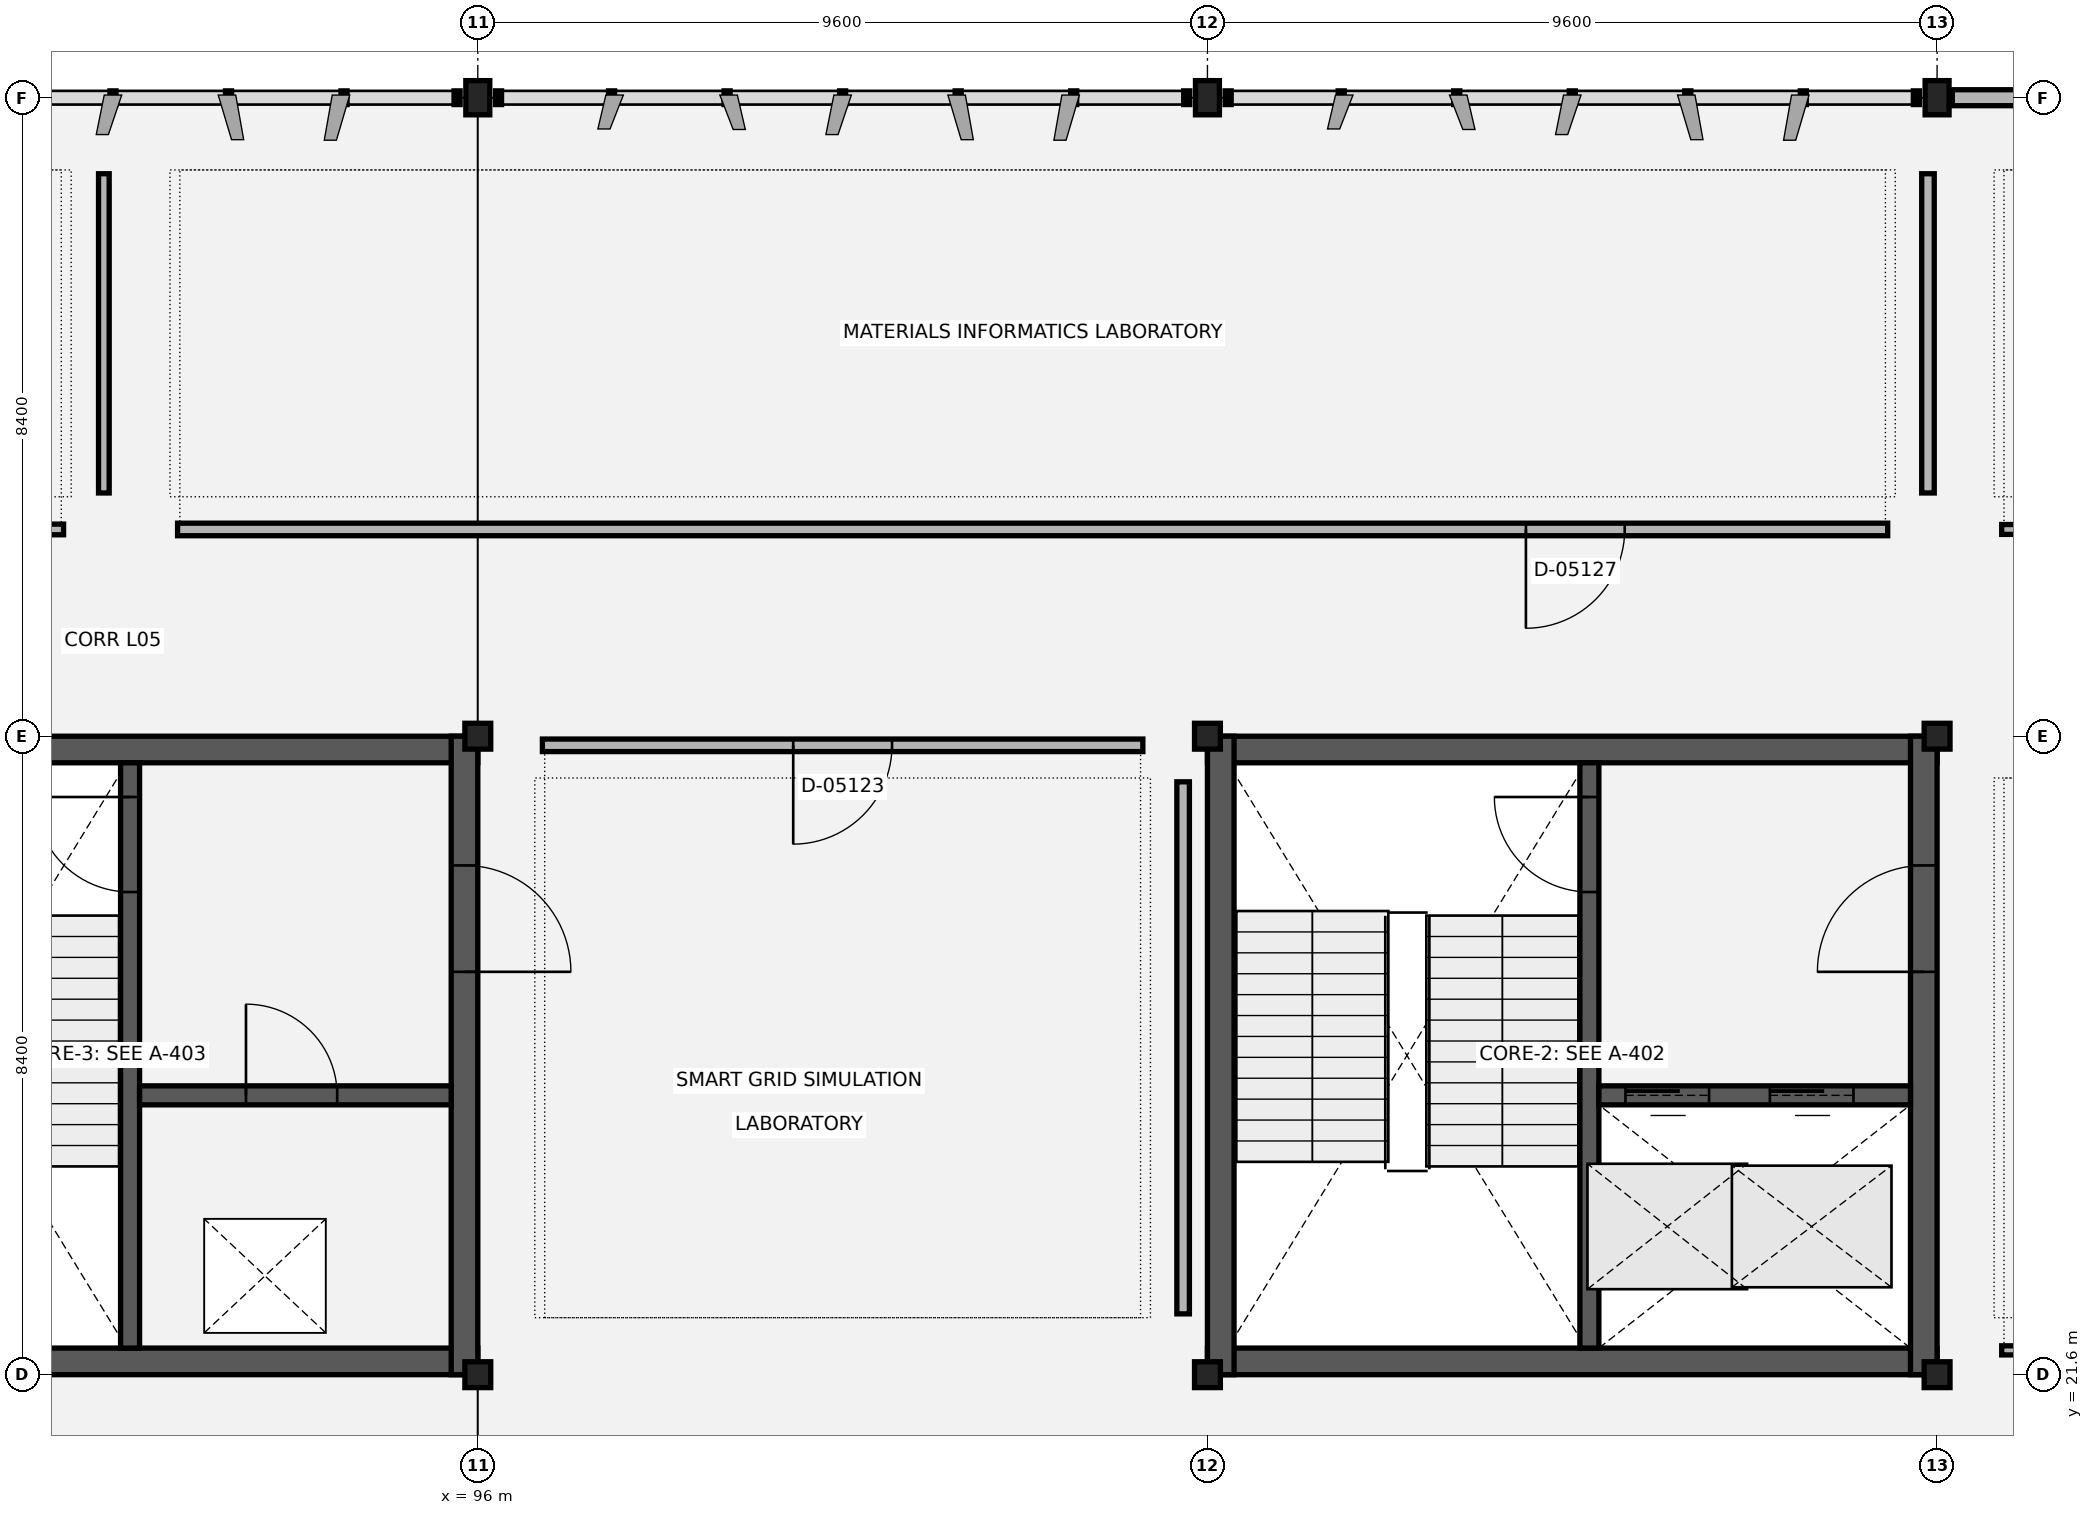
"""IFC4 building model, lengths in metres.
Left out: names, types, materials, properties, quantities, classifications, styles, units other than length and angle.
Written with IfcOpenShell. Run it as: python <this file> out.ifc"""

import sys

from ifc_helpers import new_model, si_unit, direction, frame, frame_2d, origin, origin_2d, place, context, subcontext, project, spatial, rectangle, extrude, element, fill, save


model = new_model("IFC4")
c1 = context("Model", 3, precision=1e-05, world=origin(), true_north=direction((0.0, 1.0)))
c2 = subcontext(c1, "Body", "Model", "MODEL_VIEW")
j1 = project(units=[si_unit("LENGTHUNIT", "METRE"), si_unit("PLANEANGLEUNIT", "RADIAN")], contexts=[c1])
p1 = place(None, origin())
s1 = spatial("IfcSite", under=j1, at=p1, CompositionType="ELEMENT")
p2 = place(p1, origin())
s2 = spatial("IfcBuilding", under=s1, at=p2, CompositionType="ELEMENT")
p3 = place(p2, frame((0.0, 0.0, 22.8)))
s3 = spatial("IfcBuildingStorey", under=s2, at=p3, CompositionType="ELEMENT", Elevation=22.8)
for number, where, z_axis, x_axis in (
    (1, (96.0, 21.6, 0.0), (0.0, 0.0, 1.0), (1.0, 0.0, 0.0)),
    (2, (96.0, 30.0, 0.0), (0.0, 0.0, 1.0), (1.0, 0.0, 0.0)),
):
    element("IfcColumn", number, at=place(p3, frame(where, z_axis=z_axis, x_axis=x_axis)), inside=s3, PredefinedType="COLUMN", context=c2, shape_type="SweptSolid", body=[
        extrude(rectangle(XDim=0.34, YDim=0.34, at=origin_2d()), origin(), (0.0, 0.0, 1.0), 4.2),
    ])
p4 = place(p3, frame((96.0, 38.4, 0.0), z_axis=(0.0, 0.0, 1.0), x_axis=(1.0, 0.0, 0.0)))
e3 = element("IfcColumn", 3, at=p4, inside=s3, PredefinedType="COLUMN", context=c2, shape_type="SweptSolid", body=[
    extrude(rectangle(XDim=0.315, YDim=0.45, at=origin_2d()), origin(), (0.0, 0.0, 1.0), 4.2),
])
for number, where, z_axis, x_axis in (
    (4, (105.6, 21.6, 0.0), (0.0, 0.0, 1.0), (1.0, 0.0, 0.0)),
    (5, (105.6, 30.0, 0.0), (0.0, 0.0, 1.0), (1.0, 0.0, 0.0)),
):
    element("IfcColumn", number, at=place(p3, frame(where, z_axis=z_axis, x_axis=x_axis)), inside=s3, PredefinedType="COLUMN", context=c2, shape_type="SweptSolid", body=[
        extrude(rectangle(XDim=0.34, YDim=0.34, at=origin_2d()), origin(), (0.0, 0.0, 1.0), 4.2),
    ])
p5 = place(p3, frame((105.6, 38.4, 0.0), z_axis=(0.0, 0.0, 1.0), x_axis=(1.0, 0.0, 0.0)))
e6 = element("IfcColumn", 6, at=p5, inside=s3, PredefinedType="COLUMN", context=c2, shape_type="SweptSolid", body=[
    extrude(rectangle(XDim=0.315, YDim=0.45, at=origin_2d()), origin(), (0.0, 0.0, 1.0), 4.2),
])
for number, where, z_axis, x_axis in (
    (7, (115.2, 21.6, 0.0), (0.0, 0.0, 1.0), (1.0, 0.0, 0.0)),
    (8, (115.2, 30.0, 0.0), (0.0, 0.0, 1.0), (1.0, 0.0, 0.0)),
):
    element("IfcColumn", number, at=place(p3, frame(where, z_axis=z_axis, x_axis=x_axis)), inside=s3, PredefinedType="COLUMN", context=c2, shape_type="SweptSolid", body=[
        extrude(rectangle(XDim=0.34, YDim=0.34, at=origin_2d()), origin(), (0.0, 0.0, 1.0), 4.2),
    ])
p6 = place(p3, frame((115.2, 38.4, 0.0), z_axis=(0.0, 0.0, 1.0), x_axis=(1.0, 0.0, 0.0)))
e9 = element("IfcColumn", 9, at=p6, inside=s3, PredefinedType="COLUMN", context=c2, shape_type="SweptSolid", body=[
    extrude(rectangle(XDim=0.315, YDim=0.45, at=origin_2d()), origin(), (0.0, 0.0, 1.0), 4.2),
])
p7 = place(p3, frame((119.8, 38.4, 0.0), z_axis=(0.0, 0.0, 1.0), x_axis=(-1.0, 0.0, 0.0)))
e10 = element("IfcWall", 10, at=p7, inside=s3, PredefinedType="SOLIDWALL", context=c2, shape_type="SweptSolid", body=[
    extrude(rectangle(XDim=4.4, YDim=0.21, at=frame_2d((2.2, 0.0))), origin(), (0.0, 0.0, 1.0), 3.07),
])
p8 = place(p7, frame((1.45, 0.0, 0.9)))
e11 = element("IfcOpeningElement", 11, at=p8, cuts=e10, PredefinedType="OPENING", context=c2, shape_type="SweptSolid", body=[
    extrude(rectangle(XDim=1.5, YDim=1.5, at=frame_2d((0.75, 0.75))), frame((0.0, 0.115, 0.0), z_axis=(0.0, -1.0, 0.0), x_axis=(1.0, 0.0, 0.0)), (0.0, 0.0, 1.0), 0.23),
])
for number, where, z_axis, x_axis in (
    (12, (105.6, 29.825, 0.0), (0.0, 0.0, 1.0), (1.0, 0.0, 0.0)),
    (13, (105.6, 21.775, 0.0), (0.0, 0.0, 1.0), (1.0, 0.0, 0.0)),
):
    element("IfcWall", number, at=place(p3, frame(where, z_axis=z_axis, x_axis=x_axis)), inside=s3, PredefinedType="SHEAR", context=c2, shape_type="SweptSolid", body=[
        extrude(rectangle(XDim=9.6, YDim=0.35, at=frame_2d((4.8, 0.0))), origin(), (0.0, 0.0, 1.0), 3.97),
    ])
p9 = place(p3, frame((105.775, 21.6, 0.0), z_axis=(0.0, 0.0, 1.0), x_axis=(0.0, 1.0, 0.0)))
e14 = element("IfcWall", 14, at=p9, inside=s3, PredefinedType="SHEAR", context=c2, shape_type="SweptSolid", body=[
    extrude(rectangle(XDim=8.4, YDim=0.35, at=frame_2d((4.2, 0.0))), origin(), (0.0, 0.0, 1.0), 3.97),
])
p10 = place(p3, frame((115.025, 21.6, 0.0), z_axis=(0.0, 0.0, 1.0), x_axis=(0.0, 1.0, 0.0)))
e15 = element("IfcWall", 15, at=p10, inside=s3, PredefinedType="SHEAR", context=c2, shape_type="SweptSolid", body=[
    extrude(rectangle(XDim=8.4, YDim=0.35, at=frame_2d((4.2, 0.0))), origin(), (0.0, 0.0, 1.0), 3.97),
])
p11 = place(p10, frame((5.3, 0.0, 0.0)))
e16 = element("IfcOpeningElement", 16, at=p11, cuts=e15, PredefinedType="OPENING", context=c2, shape_type="SweptSolid", body=[
    extrude(rectangle(XDim=1.4, YDim=2.15, at=frame_2d((0.7, 1.075))), frame((0.0, 0.185, 0.0), z_axis=(0.0, -1.0, 0.0), x_axis=(1.0, 0.0, 0.0)), (0.0, 0.0, 1.0), 0.37),
])
p12 = place(p3, frame((110.625, 29.65, 0.0), z_axis=(0.0, 0.0, 1.0), x_axis=(0.0, -1.0, 0.0)))
e17 = element("IfcWall", 17, at=p12, inside=s3, PredefinedType="SHEAR", context=c2, shape_type="SweptSolid", body=[
    extrude(rectangle(XDim=7.7, YDim=0.25, at=frame_2d((3.85, 0.0))), origin(), (0.0, 0.0, 1.0), 3.97),
])
p13 = place(p12, frame((0.45, 0.0, 0.0)))
e18 = element("IfcOpeningElement", 18, at=p13, cuts=e17, PredefinedType="OPENING", context=c2, shape_type="SweptSolid", body=[
    extrude(rectangle(XDim=1.25, YDim=2.15, at=frame_2d((0.625, 1.075))), frame((0.0, 0.135, 0.0), z_axis=(0.0, -1.0, 0.0), x_axis=(1.0, 0.0, 0.0)), (0.0, 0.0, 1.0), 0.27),
])
p14 = place(p3, frame((110.75, 25.275, 0.0), z_axis=(0.0, 0.0, 1.0), x_axis=(1.0, 0.0, 0.0)))
e19 = element("IfcWall", 19, at=p14, inside=s3, PredefinedType="SHEAR", context=c2, shape_type="SweptSolid", body=[
    extrude(rectangle(XDim=4.1, YDim=0.25, at=frame_2d((2.05, 0.0))), origin(), (0.0, 0.0, 1.0), 3.97),
])
p15 = place(p14, frame((0.35, 0.0, 0.0)))
e20 = element("IfcOpeningElement", 20, at=p15, cuts=e19, PredefinedType="OPENING", context=c2, shape_type="SweptSolid", body=[
    extrude(rectangle(XDim=1.1, YDim=2.15, at=frame_2d((0.55, 1.075))), frame((0.0, 0.135, 0.0), z_axis=(0.0, -1.0, 0.0), x_axis=(1.0, 0.0, 0.0)), (0.0, 0.0, 1.0), 0.27),
])
p16 = place(p14, frame((2.25, 0.0, 0.0)))
e21 = element("IfcOpeningElement", 21, at=p16, cuts=e19, PredefinedType="OPENING", context=c2, shape_type="SweptSolid", body=[
    extrude(rectangle(XDim=1.1, YDim=2.15, at=frame_2d((0.55, 1.075))), frame((0.0, 0.135, 0.0), z_axis=(0.0, -1.0, 0.0), x_axis=(1.0, 0.0, 0.0)), (0.0, 0.0, 1.0), 0.27),
])
for number, where, z_axis, x_axis in (
    (22, (86.4, 29.825, 0.0), (0.0, 0.0, 1.0), (1.0, 0.0, 0.0)),
    (23, (86.4, 21.775, 0.0), (0.0, 0.0, 1.0), (1.0, 0.0, 0.0)),
):
    element("IfcWall", number, at=place(p3, frame(where, z_axis=z_axis, x_axis=x_axis)), inside=s3, PredefinedType="SHEAR", context=c2, shape_type="SweptSolid", body=[
        extrude(rectangle(XDim=9.6, YDim=0.35, at=frame_2d((4.8, 0.0))), origin(), (0.0, 0.0, 1.0), 3.97),
    ])
p17 = place(p3, frame((95.825, 21.6, 0.0), z_axis=(0.0, 0.0, 1.0), x_axis=(0.0, 1.0, 0.0)))
e24 = element("IfcWall", 24, at=p17, inside=s3, PredefinedType="SHEAR", context=c2, shape_type="SweptSolid", body=[
    extrude(rectangle(XDim=8.4, YDim=0.35, at=frame_2d((4.2, 0.0))), origin(), (0.0, 0.0, 1.0), 3.97),
])
p18 = place(p17, frame((5.3, 0.0, 0.0)))
e25 = element("IfcOpeningElement", 25, at=p18, cuts=e24, PredefinedType="OPENING", context=c2, shape_type="SweptSolid", body=[
    extrude(rectangle(XDim=1.4, YDim=2.15, at=frame_2d((0.7, 1.075))), frame((0.0, 0.185, 0.0), z_axis=(0.0, -1.0, 0.0), x_axis=(1.0, 0.0, 0.0)), (0.0, 0.0, 1.0), 0.37),
])
p19 = place(p3, frame((91.425, 29.65, 0.0), z_axis=(0.0, 0.0, 1.0), x_axis=(0.0, -1.0, 0.0)))
e26 = element("IfcWall", 26, at=p19, inside=s3, PredefinedType="SHEAR", context=c2, shape_type="SweptSolid", body=[
    extrude(rectangle(XDim=7.7, YDim=0.25, at=frame_2d((3.85, 0.0))), origin(), (0.0, 0.0, 1.0), 3.97),
])
p20 = place(p19, frame((0.45, 0.0, 0.0)))
e27 = element("IfcOpeningElement", 27, at=p20, cuts=e26, PredefinedType="OPENING", context=c2, shape_type="SweptSolid", body=[
    extrude(rectangle(XDim=1.25, YDim=2.15, at=frame_2d((0.625, 1.075))), frame((0.0, 0.135, 0.0), z_axis=(0.0, -1.0, 0.0), x_axis=(1.0, 0.0, 0.0)), (0.0, 0.0, 1.0), 0.27),
])
p21 = place(p3, frame((91.55, 25.275, 0.0), z_axis=(0.0, 0.0, 1.0), x_axis=(1.0, 0.0, 0.0)))
e28 = element("IfcWall", 28, at=p21, inside=s3, PredefinedType="SHEAR", context=c2, shape_type="SweptSolid", body=[
    extrude(rectangle(XDim=4.1, YDim=0.25, at=frame_2d((2.05, 0.0))), origin(), (0.0, 0.0, 1.0), 3.97),
])
p22 = place(p21, frame((1.4, 0.0, 0.0)))
e29 = element("IfcOpeningElement", 29, at=p22, cuts=e28, PredefinedType="OPENING", context=c2, shape_type="SweptSolid", body=[
    extrude(rectangle(XDim=1.2, YDim=2.15, at=frame_2d((0.6, 1.075))), frame((0.0, 0.135, 0.0), z_axis=(0.0, -1.0, 0.0), x_axis=(1.0, 0.0, 0.0)), (0.0, 0.0, 1.0), 0.27),
])
p23 = place(p3, frame((96.85, 29.88, 0.0), z_axis=(0.0, 0.0, 1.0), x_axis=(1.0, 0.0, 0.0)))
e30 = element("IfcWall", 30, at=p23, inside=s3, PredefinedType="PARTITIONING", context=c2, shape_type="SweptSolid", body=[
    extrude(rectangle(XDim=7.9, YDim=0.165, at=frame_2d((3.95, 0.0))), origin(), (0.0, 0.0, 1.0), 3.05),
])
p24 = place(p23, frame((3.3, 0.0, 0.0)))
e31 = element("IfcOpeningElement", 31, at=p24, cuts=e30, PredefinedType="OPENING", context=c2, shape_type="SweptSolid", body=[
    extrude(rectangle(XDim=1.3, YDim=2.15, at=frame_2d((0.65, 1.075))), frame((0.0, 0.093, 0.0), z_axis=(0.0, -1.0, 0.0), x_axis=(1.0, 0.0, 0.0)), (0.0, 0.0, 1.0), 0.185),
])
p25 = place(p3, frame((105.28, 22.4, 0.0), z_axis=(0.0, 0.0, 1.0), x_axis=(0.0, 1.0, 0.0)))
e32 = element("IfcWall", 32, at=p25, inside=s3, PredefinedType="PARTITIONING", context=c2, shape_type="SweptSolid", body=[
    extrude(rectangle(XDim=7.0, YDim=0.165, at=frame_2d((3.5, 0.0))), origin(), (0.0, 0.0, 1.0), 3.05),
])
p26 = place(p3, frame((116.05, 21.92, 0.0), z_axis=(0.0, 0.0, 1.0), x_axis=(1.0, 0.0, 0.0)))
e33 = element("IfcWall", 33, at=p26, inside=s3, PredefinedType="PARTITIONING", context=c2, shape_type="SweptSolid", body=[
    extrude(rectangle(XDim=2.9, YDim=0.12, at=frame_2d((1.45, 0.0))), origin(), (0.0, 0.0, 1.0), 3.05),
])
p27 = place(p26, frame((1.09, 0.0, 0.0)))
e34 = element("IfcOpeningElement", 34, at=p27, cuts=e33, PredefinedType="OPENING", context=c2, shape_type="SweptSolid", body=[
    extrude(rectangle(XDim=0.95, YDim=2.1, at=frame_2d((0.475, 1.05))), frame((0.0, 0.07, 0.0), z_axis=(0.0, -1.0, 0.0), x_axis=(1.0, 0.0, 0.0)), (0.0, 0.0, 1.0), 0.14),
])
p28 = place(p3, frame((116.05, 32.72, 0.0), z_axis=(0.0, 0.0, 1.0), x_axis=(1.0, 0.0, 0.0)))
e35 = element("IfcWall", 35, at=p28, inside=s3, PredefinedType="PARTITIONING", context=c2, shape_type="SweptSolid", body=[
    extrude(rectangle(XDim=2.9, YDim=0.13, at=frame_2d((1.45, 0.0))), origin(), (0.0, 0.0, 1.0), 3.05),
])
p29 = place(p28, frame((1.072, 0.0, 0.0)))
e36 = element("IfcOpeningElement", 36, at=p29, cuts=e35, PredefinedType="OPENING", context=c2, shape_type="SweptSolid", body=[
    extrude(rectangle(XDim=0.98, YDim=2.1, at=frame_2d((0.49, 1.05))), frame((0.0, 0.075, 0.0), z_axis=(0.0, -1.0, 0.0), x_axis=(1.0, 0.0, 0.0)), (0.0, 0.0, 1.0), 0.15),
])
p30 = place(p3, frame((67.85, 32.72, 0.0), z_axis=(0.0, 0.0, 1.0), x_axis=(1.0, 0.0, 0.0)))
e37 = element("IfcWall", 37, at=p30, inside=s3, PredefinedType="PARTITIONING", context=c2, shape_type="SweptSolid", body=[
    extrude(rectangle(XDim=22.7, YDim=0.14, at=frame_2d((11.35, 0.0))), origin(), (0.0, 0.0, 1.0), 3.05),
])
p31 = place(p30, frame((3.529, 0.0, 0.0)))
e38 = element("IfcOpeningElement", 38, at=p31, cuts=e37, PredefinedType="OPENING", context=c2, shape_type="SweptSolid", body=[
    extrude(rectangle(XDim=1.04, YDim=2.15, at=frame_2d((0.52, 1.075))), frame((0.0, 0.08, 0.0), z_axis=(0.0, -1.0, 0.0), x_axis=(1.0, 0.0, 0.0)), (0.0, 0.0, 1.0), 0.16),
])
p32 = place(p3, frame((91.08, 33.2, 0.0), z_axis=(0.0, 0.0, 1.0), x_axis=(0.0, 1.0, 0.0)))
e39 = element("IfcWall", 39, at=p32, inside=s3, PredefinedType="PARTITIONING", context=c2, shape_type="SweptSolid", body=[
    extrude(rectangle(XDim=4.2, YDim=0.14, at=frame_2d((2.1, 0.0))), origin(), (0.0, 0.0, 1.0), 3.05),
])
p33 = place(p3, frame((92.05, 32.72, 0.0), z_axis=(0.0, 0.0, 1.0), x_axis=(1.0, 0.0, 0.0)))
e40 = element("IfcWall", 40, at=p33, inside=s3, PredefinedType="PARTITIONING", context=c2, shape_type="SweptSolid", body=[
    extrude(rectangle(XDim=22.5, YDim=0.165, at=frame_2d((11.25, 0.0))), origin(), (0.0, 0.0, 1.0), 3.05),
])
p34 = place(p33, frame((17.74, 0.0, 0.0)))
e41 = element("IfcOpeningElement", 41, at=p34, cuts=e40, PredefinedType="OPENING", context=c2, shape_type="SweptSolid", body=[
    extrude(rectangle(XDim=1.3, YDim=2.15, at=frame_2d((0.65, 1.075))), frame((0.0, 0.093, 0.0), z_axis=(0.0, -1.0, 0.0), x_axis=(1.0, 0.0, 0.0)), (0.0, 0.0, 1.0), 0.185),
])
p35 = place(p3, frame((115.08, 33.2, 0.0), z_axis=(0.0, 0.0, 1.0), x_axis=(0.0, 1.0, 0.0)))
e42 = element("IfcWall", 42, at=p35, inside=s3, PredefinedType="PARTITIONING", context=c2, shape_type="SweptSolid", body=[
    extrude(rectangle(XDim=4.2, YDim=0.165, at=frame_2d((2.1, 0.0))), origin(), (0.0, 0.0, 1.0), 3.05),
])
p36 = place(p13, origin())
e43 = element("IfcDoor", 43, at=p36, inside=s3, OperationType="SINGLE_SWING_RIGHT", PredefinedType="DOOR", context=c2, shape_type="SweptSolid", body=[
    extrude(rectangle(XDim=1.25, YDim=2.15, at=frame_2d((0.625, 1.075))), frame((0.0, 0.025, 0.0), z_axis=(0.0, -1.0, 0.0), x_axis=(1.0, 0.0, 0.0)), (0.0, 0.0, 1.0), 0.05),
])
fill(e18, e43)
p37 = place(p15, origin())
e44 = element("IfcDoor", 44, at=p37, inside=s3, OperationType="SLIDING_TO_LEFT", PredefinedType="DOOR", context=c2, shape_type="SweptSolid", body=[
    extrude(rectangle(XDim=1.1, YDim=2.15, at=frame_2d((0.55, 1.075))), frame((0.0, 0.025, 0.0), z_axis=(0.0, -1.0, 0.0), x_axis=(1.0, 0.0, 0.0)), (0.0, 0.0, 1.0), 0.05),
])
fill(e20, e44)
p38 = place(p16, origin())
e45 = element("IfcDoor", 45, at=p38, inside=s3, OperationType="SLIDING_TO_LEFT", PredefinedType="DOOR", context=c2, shape_type="SweptSolid", body=[
    extrude(rectangle(XDim=1.1, YDim=2.15, at=frame_2d((0.55, 1.075))), frame((0.0, 0.025, 0.0), z_axis=(0.0, -1.0, 0.0), x_axis=(1.0, 0.0, 0.0)), (0.0, 0.0, 1.0), 0.05),
])
fill(e21, e45)
p39 = place(p11, origin())
e46 = element("IfcDoor", 46, at=p39, inside=s3, OperationType="SINGLE_SWING_LEFT", PredefinedType="DOOR", context=c2, shape_type="SweptSolid", body=[
    extrude(rectangle(XDim=1.4, YDim=2.15, at=frame_2d((0.7, 1.075))), frame((0.0, 0.025, 0.0), z_axis=(0.0, -1.0, 0.0), x_axis=(1.0, 0.0, 0.0)), (0.0, 0.0, 1.0), 0.05),
])
fill(e16, e46)
p40 = place(p20, origin())
e47 = element("IfcDoor", 47, at=p40, inside=s3, OperationType="SINGLE_SWING_RIGHT", PredefinedType="DOOR", context=c2, shape_type="SweptSolid", body=[
    extrude(rectangle(XDim=1.25, YDim=2.15, at=frame_2d((0.625, 1.075))), frame((0.0, 0.025, 0.0), z_axis=(0.0, -1.0, 0.0), x_axis=(1.0, 0.0, 0.0)), (0.0, 0.0, 1.0), 0.05),
])
fill(e27, e47)
p41 = place(p22, origin())
e48 = element("IfcDoor", 48, at=p41, inside=s3, OperationType="SINGLE_SWING_LEFT", PredefinedType="DOOR", context=c2, shape_type="SweptSolid", body=[
    extrude(rectangle(XDim=1.2, YDim=2.15, at=frame_2d((0.6, 1.075))), frame((0.0, 0.025, 0.0), z_axis=(0.0, -1.0, 0.0), x_axis=(1.0, 0.0, 0.0)), (0.0, 0.0, 1.0), 0.05),
])
fill(e29, e48)
p42 = place(p18, origin())
e49 = element("IfcDoor", 49, at=p42, inside=s3, OperationType="SINGLE_SWING_RIGHT", PredefinedType="DOOR", context=c2, shape_type="SweptSolid", body=[
    extrude(rectangle(XDim=1.4, YDim=2.15, at=frame_2d((0.7, 1.075))), frame((0.0, 0.025, 0.0), z_axis=(0.0, -1.0, 0.0), x_axis=(1.0, 0.0, 0.0)), (0.0, 0.0, 1.0), 0.05),
])
fill(e25, e49)
p43 = place(p24, origin())
e50 = element("IfcDoor", 50, at=p43, inside=s3, OperationType="SINGLE_SWING_RIGHT", PredefinedType="DOOR", context=c2, shape_type="SweptSolid", body=[
    extrude(rectangle(XDim=1.3, YDim=2.15, at=frame_2d((0.65, 1.075))), frame((0.0, 0.025, 0.0), z_axis=(0.0, -1.0, 0.0), x_axis=(1.0, 0.0, 0.0)), (0.0, 0.0, 1.0), 0.05),
])
fill(e31, e50)
p44 = place(p34, origin())
e51 = element("IfcDoor", 51, at=p44, inside=s3, OperationType="SINGLE_SWING_RIGHT", PredefinedType="DOOR", context=c2, shape_type="SweptSolid", body=[
    extrude(rectangle(XDim=1.3, YDim=2.15, at=frame_2d((0.65, 1.075))), frame((0.0, 0.025, 0.0), z_axis=(0.0, -1.0, 0.0), x_axis=(1.0, 0.0, 0.0)), (0.0, 0.0, 1.0), 0.05),
])
fill(e41, e51)
save(model, sys.argv[1])
